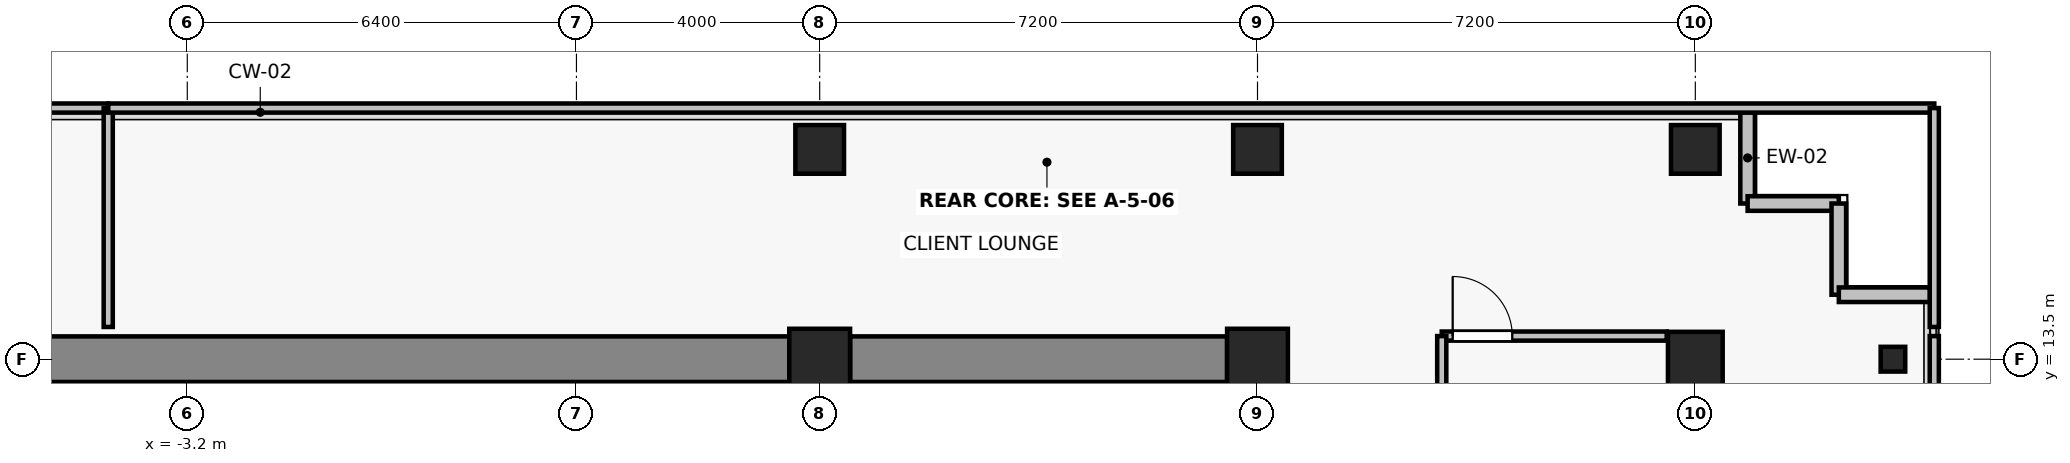
"""IFC4 building model, lengths in metres.
Left out: names, types, materials, properties, quantities, classifications, styles, units other than length and angle.
Written with IfcOpenShell. Run it as: python <this file> out.ifc"""

import sys

from ifc_helpers import new_model, si_unit, direction, frame, frame_2d, origin, origin_2d, place, context, subcontext, project, spatial, rectangle, i_section, extrude, source, transform, mapped, element, fill, save


model = new_model("IFC4")
c1 = context("Model", 3, precision=1e-05, world=origin(), true_north=direction((0.0, 1.0)))
c2 = subcontext(c1, "Body", "Model", "MODEL_VIEW")
j1 = project(units=[si_unit("LENGTHUNIT", "METRE"), si_unit("PLANEANGLEUNIT", "RADIAN")], contexts=[c1])
p1 = place(None, origin())
s1 = spatial("IfcSite", under=j1, at=p1, CompositionType="ELEMENT")
p2 = place(p1, origin())
s2 = spatial("IfcBuilding", under=s1, at=p2, CompositionType="ELEMENT")
p3 = place(p2, frame((0.0, 0.0, 106.6)))
s3 = spatial("IfcBuildingStorey", under=s2, at=p3, CompositionType="ELEMENT", Elevation=106.6)
for number, where, z_axis, x_axis in (
    (1, (7.2, 13.5, 0.0), (0.0, 0.0, 1.0), (1.0, 0.0, 0.0)),
    (2, (14.4, 13.5, 0.0), (0.0, 0.0, 1.0), (1.0, 0.0, 0.0)),
):
    element("IfcColumn", number, at=place(p3, frame(where, z_axis=z_axis, x_axis=x_axis)), inside=s3, PredefinedType="COLUMN", context=c2, shape_type="SweptSolid", body=[
        extrude(rectangle(XDim=1.0, YDim=1.0, at=origin_2d()), origin(), (0.0, 0.0, 1.0), 3.3),
    ])
p4 = place(p3, frame((21.6, 13.5, 0.0), z_axis=(0.0, 0.0, 1.0), x_axis=(1.0, 0.0, 0.0)))
e3 = element("IfcColumn", 3, at=p4, inside=s3, PredefinedType="COLUMN", context=c2, shape_type="SweptSolid", body=[
    extrude(rectangle(XDim=0.9, YDim=0.9, at=origin_2d()), origin(), (0.0, 0.0, 1.0), 3.3),
])
for number, where, z_axis, x_axis in (
    (4, (7.2, 16.95, 0.0), (0.0, 0.0, 1.0), (1.0, 0.0, 0.0)),
    (5, (14.4, 16.95, 0.0), (0.0, 0.0, 1.0), (1.0, 0.0, 0.0)),
    (6, (21.6, 16.95, 0.0), (0.0, 0.0, 1.0), (1.0, 0.0, 0.0)),
):
    element("IfcColumn", number, at=place(p3, frame(where, z_axis=z_axis, x_axis=x_axis)), inside=s3, PredefinedType="COLUMN", context=c2, shape_type="SweptSolid", body=[
        extrude(rectangle(XDim=0.8, YDim=0.8, at=origin_2d()), origin(), (0.0, 0.0, 1.0), 3.3),
    ])
p5 = place(p3, frame((24.85, 13.5, 0.0), z_axis=(0.0, 0.0, 1.0), x_axis=(1.0, 0.0, 0.0)))
e7 = element("IfcColumn", 7, at=p5, inside=s3, PredefinedType="COLUMN", context=c2, shape_type="SweptSolid", body=[
    extrude(i_section(OverallWidth=0.404, OverallDepth=0.407, WebThickness=0.022, FlangeThickness=0.032, FilletRadius=0.015, at=origin_2d()), origin(), (0.0, 0.0, 1.0), 3.3),
])
p6 = place(p3, frame((-6.7, 13.5, 0.0), z_axis=(0.0, 0.0, 1.0), x_axis=(1.0, 0.0, 0.0)))
e8 = element("IfcWall", 8, at=p6, inside=s3, PredefinedType="SHEAR", context=c2, shape_type="SweptSolid", body=[
    extrude(rectangle(XDim=13.4, YDim=0.75, at=frame_2d((6.7, 0.0))), origin(), (0.0, 0.0, 1.0), 3.075),
])
p7 = place(p3, frame((7.7, 13.5, 0.0), z_axis=(0.0, 0.0, 1.0), x_axis=(1.0, 0.0, 0.0)))
e9 = element("IfcWall", 9, at=p7, inside=s3, PredefinedType="SHEAR", context=c2, shape_type="SweptSolid", body=[
    extrude(rectangle(XDim=6.2, YDim=0.75, at=frame_2d((3.1, 0.0))), origin(), (0.0, 0.0, 1.0), 3.075),
])
p8 = place(p3, frame((22.46, 16.06, 0.0), z_axis=(0.0, 0.0, 1.0), x_axis=(0.0, 1.0, 0.0)))
e10 = element("IfcWall", 10, at=p8, inside=s3, PredefinedType="SOLIDWALL", context=c2, shape_type="SweptSolid", body=[
    extrude(rectangle(XDim=1.5, YDim=0.24, at=frame_2d((0.75, 0.0))), origin(), (0.0, 0.0, 1.0), 2.565),
])
for number, where, z_axis, x_axis in (
    (11, (23.96, 16.06, 0.0), (0.0, 0.0, 1.0), (-1.0, 0.0, 0.0)),
    (12, (23.96, 14.56, 0.0), (0.0, 0.0, 1.0), (0.0, 1.0, 0.0)),
    (13, (25.46, 14.56, 0.0), (0.0, 0.0, 1.0), (-1.0, 0.0, 0.0)),
):
    element("IfcWall", number, at=place(p3, frame(where, z_axis=z_axis, x_axis=x_axis)), inside=s3, PredefinedType="SOLIDWALL", context=c2, shape_type="SweptSolid", body=[
        extrude(rectangle(XDim=1.5, YDim=0.24, at=frame_2d((0.75, 0.0))), origin(), (0.0, 0.0, 1.0), 3.075),
    ])
p9 = place(p3, frame((17.43, 13.88, 0.0), z_axis=(0.0, 0.0, 1.0), x_axis=(1.0, 0.0, 0.0)))
e14 = element("IfcWall", 14, at=p9, inside=s3, PredefinedType="PARTITIONING", context=c2, shape_type="SweptSolid", body=[
    extrude(rectangle(XDim=3.7, YDim=0.15, at=frame_2d((1.85, 0.0))), origin(), (0.0, 0.0, 1.0), 3.075),
])
p10 = place(p9, frame((0.18, 0.0, 0.0)))
e15 = element("IfcOpeningElement", 15, at=p10, cuts=e14, PredefinedType="OPENING", context=c2, shape_type="SweptSolid", body=[
    extrude(rectangle(XDim=0.98, YDim=2.15, at=frame_2d((0.49, 1.075))), frame((0.0, 0.085, 0.0), z_axis=(0.0, -1.0, 0.0), x_axis=(1.0, 0.0, 0.0)), (0.0, 0.0, 1.0), 0.17),
])
p11 = place(p3, frame((17.43, -1.77, 0.0), z_axis=(0.0, 0.0, 1.0), x_axis=(0.0, 1.0, 0.0)))
e16 = element("IfcWall", 16, at=p11, inside=s3, PredefinedType="PARTITIONING", context=c2, shape_type="SweptSolid", body=[
    extrude(rectangle(XDim=15.65, YDim=0.15, at=frame_2d((7.825, 0.0))), origin(), (0.0, 0.0, 1.0), 2.515),
])
p12 = place(p11, frame((7.335, 0.0, 0.0)))
e17 = element("IfcOpeningElement", 17, at=p12, cuts=e16, PredefinedType="OPENING", context=c2, shape_type="SweptSolid", body=[
    extrude(rectangle(XDim=0.98, YDim=2.15, at=frame_2d((0.49, 1.075))), frame((0.0, 0.085, 0.0), z_axis=(0.0, -1.0, 0.0), x_axis=(1.0, 0.0, 0.0)), (0.0, 0.0, 1.0), 0.17),
])
p13 = place(p3, frame((25.53, 13.88, 0.0), z_axis=(0.0, 0.0, 1.0), x_axis=(0.0, -1.0, 0.0)))
e18 = element("IfcWall", 18, at=p13, inside=s3, PredefinedType="PARTITIONING", context=c2, shape_type="SweptSolid", body=[
    extrude(rectangle(XDim=15.65, YDim=0.15, at=frame_2d((7.825, 0.0))), origin(), (0.0, 0.0, 1.0), 3.075),
])
p14 = place(p3, frame((-29.53, 17.63, 0.0), z_axis=(0.0, 0.0, 1.0), x_axis=(1.0, 0.0, 0.0)))
e19 = element("IfcWall", 19, at=p14, inside=s3, PredefinedType="PARTITIONING", context=c2, shape_type="SweptSolid", body=[
    extrude(rectangle(XDim=25.03, YDim=0.15, at=frame_2d((12.515, 0.0))), origin(), (0.0, 0.0, 1.0), 3.075),
])
p15 = place(p3, frame((-4.5, 17.63, 0.0), z_axis=(0.0, 0.0, 1.0), x_axis=(0.0, -1.0, 0.0)))
e20 = element("IfcWall", 20, at=p15, inside=s3, PredefinedType="PARTITIONING", context=c2, shape_type="SweptSolid", body=[
    extrude(rectangle(XDim=3.6, YDim=0.15, at=frame_2d((1.8, 0.0))), origin(), (0.0, 0.0, 1.0), 2.565),
])
p16 = place(p3, frame((-4.5, 17.63, 0.0), z_axis=(0.0, 0.0, 1.0), x_axis=(1.0, 0.0, 0.0)))
e21 = element("IfcWall", 21, at=p16, inside=s3, PredefinedType="PARTITIONING", context=c2, shape_type="SweptSolid", body=[
    extrude(rectangle(XDim=30.03, YDim=0.15, at=frame_2d((15.015, 0.0))), origin(), (0.0, 0.0, 1.0), 3.075),
])
p17 = place(p3, frame((25.53, 17.63, 0.0), z_axis=(0.0, 0.0, 1.0), x_axis=(0.0, -1.0, 0.0)))
e22 = element("IfcWall", 22, at=p17, inside=s3, PredefinedType="PARTITIONING", context=c2, shape_type="SweptSolid", body=[
    extrude(rectangle(XDim=3.6, YDim=0.15, at=frame_2d((1.8, 0.0))), origin(), (0.0, 0.0, 1.0), 3.075),
])
m1 = source(origin(), c2, "Body", "SweptSolid", [
    extrude(rectangle(XDim=0.98, YDim=2.15, at=frame_2d((0.49, 1.075))), frame((0.0, 0.025, 0.0), z_axis=(0.0, -1.0, 0.0), x_axis=(1.0, 0.0, 0.0)), (0.0, 0.0, 1.0), 0.05),
])
p18 = place(p10, origin())
e23 = element("IfcDoor", 23, at=p18, inside=s3, OperationType="SINGLE_SWING_LEFT", PredefinedType="DOOR", context=c2, shape_type="MappedRepresentation", body=[
    mapped(m1, transform((0.0, 0.0, 0.0), x_axis=(1.0, 0.0, 0.0), y_axis=(0.0, 1.0, 0.0), z_axis=(0.0, 0.0, 1.0), scale=1.0)),
])
fill(e15, e23)
save(model, sys.argv[1])
